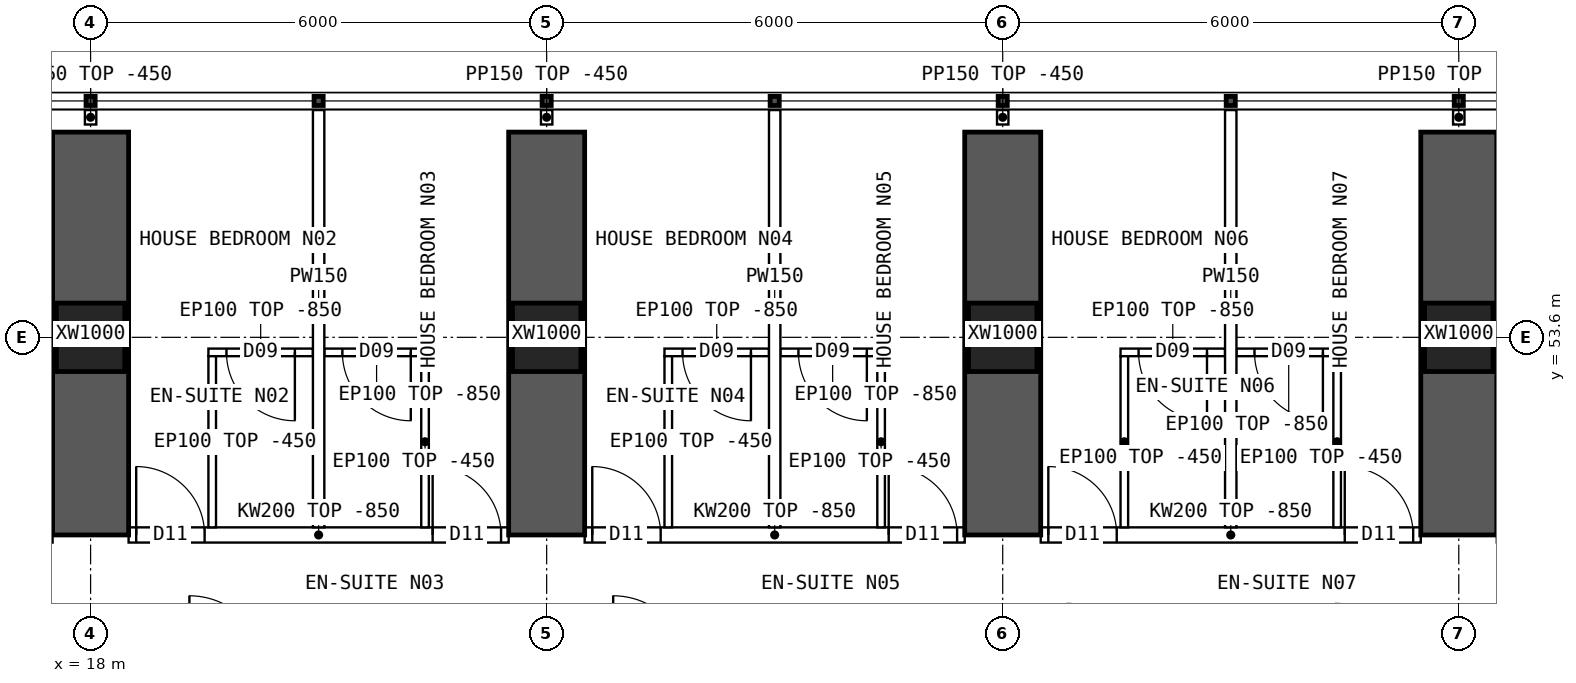
"""IFC4 building model, lengths in metres.
Left out: names, types, materials, properties, quantities, classifications, styles, units other than length and angle.
Written with IfcOpenShell. Run it as: python <this file> out.ifc"""

import sys

from ifc_helpers import new_model, si_unit, direction, frame, frame_2d, origin, origin_2d, place, context, subcontext, project, spatial, polyline, rectangle, hollow_rectangle, outline, extrude, element, fill, save


model = new_model("IFC4")
c1 = context("Model", 3, precision=1e-05, world=origin(), true_north=direction((0.0, 1.0)))
c2 = subcontext(c1, "Body", "Model", "MODEL_VIEW")
j1 = project(units=[si_unit("LENGTHUNIT", "METRE"), si_unit("PLANEANGLEUNIT", "RADIAN")], contexts=[c1])
p1 = place(None, origin())
s1 = spatial("IfcSite", under=j1, at=p1, CompositionType="ELEMENT")
p2 = place(p1, origin())
s2 = spatial("IfcBuilding", under=s1, at=p2, CompositionType="ELEMENT")
p3 = place(p2, frame((0.0, 0.0, 35.2)))
s3 = spatial("IfcBuildingStorey", under=s2, at=p3, CompositionType="ELEMENT", Elevation=35.2)
for number, where, z_axis, x_axis in (
    (1, (18.0, 53.6, 0.0), (0.0, 0.0, 1.0), (1.0, 0.0, 0.0)),
    (2, (24.0, 53.6, 0.0), (0.0, 0.0, 1.0), (1.0, 0.0, 0.0)),
    (3, (30.0, 53.6, 0.0), (0.0, 0.0, 1.0), (1.0, 0.0, 0.0)),
    (4, (36.0, 53.6, 0.0), (0.0, 0.0, 1.0), (1.0, 0.0, 0.0)),
):
    element("IfcColumn", number, at=place(p3, frame(where, z_axis=z_axis, x_axis=x_axis)), inside=s3, PredefinedType="COLUMN", context=c2, shape_type="SweptSolid", body=[
        extrude(hollow_rectangle(XDim=0.9, YDim=0.9, WallThickness=0.09, at=origin_2d()), origin(), (0.0, 0.0, 1.0), 3.75),
    ])
for number, where, z_axis, x_axis in (
    (5, (18.0, 51.0, 0.0), (0.0, 0.0, 1.0), (0.0, 1.0, 0.0)),
    (6, (24.0, 51.0, 0.0), (0.0, 0.0, 1.0), (0.0, 1.0, 0.0)),
    (7, (30.0, 51.0, 0.0), (0.0, 0.0, 1.0), (0.0, 1.0, 0.0)),
    (8, (36.0, 51.0, 0.0), (0.0, 0.0, 1.0), (0.0, 1.0, 0.0)),
):
    element("IfcWall", number, at=place(p3, frame(where, z_axis=z_axis, x_axis=x_axis)), inside=s3, PredefinedType="SHEAR", context=c2, shape_type="SweptSolid", body=[
        extrude(rectangle(XDim=5.3, YDim=1.0, at=frame_2d((2.65, 0.0))), origin(), (0.0, 0.0, 1.0), 3.75),
    ])
p4 = place(p3, frame((18.5, 51.0, 0.0), z_axis=(0.0, 0.0, 1.0), x_axis=(1.0, 0.0, 0.0)))
e9 = element("IfcWall", 9, at=p4, inside=s3, PredefinedType="SOLIDWALL", context=c2, shape_type="SweptSolid", body=[
    extrude(outline(polyline([(0.0, 0.0), (5.0, 0.0), (5.0, 2.9), (0.0, 2.9), (0.0, 0.0)])), frame((0.0, 0.1, 0.0), z_axis=(0.0, -1.0, 0.0), x_axis=(1.0, 0.0, 0.0)), (0.0, 0.0, 1.0), 0.2),
])
p5 = place(p4, frame((0.1, 0.0, 0.0)))
e10 = element("IfcOpeningElement", 10, at=p5, cuts=e9, PredefinedType="OPENING", context=c2, shape_type="SweptSolid", body=[
    extrude(rectangle(XDim=0.9, YDim=2.1, at=frame_2d((0.45, 1.05))), frame((0.0, 0.11, 0.0), z_axis=(0.0, -1.0, 0.0), x_axis=(1.0, 0.0, 0.0)), (0.0, 0.0, 1.0), 0.22),
])
p6 = place(p4, frame((4.0, 0.0, 0.0)))
e11 = element("IfcOpeningElement", 11, at=p6, cuts=e9, PredefinedType="OPENING", context=c2, shape_type="SweptSolid", body=[
    extrude(rectangle(XDim=0.9, YDim=2.1, at=frame_2d((0.45, 1.05))), frame((0.0, 0.11, 0.0), z_axis=(0.0, -1.0, 0.0), x_axis=(1.0, 0.0, 0.0)), (0.0, 0.0, 1.0), 0.22),
])
p7 = place(p3, frame((24.5, 51.0, 0.0), z_axis=(0.0, 0.0, 1.0), x_axis=(1.0, 0.0, 0.0)))
e12 = element("IfcWall", 12, at=p7, inside=s3, PredefinedType="SOLIDWALL", context=c2, shape_type="SweptSolid", body=[
    extrude(outline(polyline([(0.0, 0.0), (5.0, 0.0), (5.0, 2.9), (0.0, 2.9), (0.0, 0.0)])), frame((0.0, 0.1, 0.0), z_axis=(0.0, -1.0, 0.0), x_axis=(1.0, 0.0, 0.0)), (0.0, 0.0, 1.0), 0.2),
])
p8 = place(p7, frame((0.1, 0.0, 0.0)))
e13 = element("IfcOpeningElement", 13, at=p8, cuts=e12, PredefinedType="OPENING", context=c2, shape_type="SweptSolid", body=[
    extrude(rectangle(XDim=0.9, YDim=2.1, at=frame_2d((0.45, 1.05))), frame((0.0, 0.11, 0.0), z_axis=(0.0, -1.0, 0.0), x_axis=(1.0, 0.0, 0.0)), (0.0, 0.0, 1.0), 0.22),
])
p9 = place(p7, frame((4.0, 0.0, 0.0)))
e14 = element("IfcOpeningElement", 14, at=p9, cuts=e12, PredefinedType="OPENING", context=c2, shape_type="SweptSolid", body=[
    extrude(rectangle(XDim=0.9, YDim=2.1, at=frame_2d((0.45, 1.05))), frame((0.0, 0.11, 0.0), z_axis=(0.0, -1.0, 0.0), x_axis=(1.0, 0.0, 0.0)), (0.0, 0.0, 1.0), 0.22),
])
p10 = place(p3, frame((30.5, 51.0, 0.0), z_axis=(0.0, 0.0, 1.0), x_axis=(1.0, 0.0, 0.0)))
e15 = element("IfcWall", 15, at=p10, inside=s3, PredefinedType="SOLIDWALL", context=c2, shape_type="SweptSolid", body=[
    extrude(outline(polyline([(0.0, 0.0), (5.0, 0.0), (5.0, 2.9), (0.0, 2.9), (0.0, 0.0)])), frame((0.0, 0.1, 0.0), z_axis=(0.0, -1.0, 0.0), x_axis=(1.0, 0.0, 0.0)), (0.0, 0.0, 1.0), 0.2),
])
p11 = place(p10, frame((0.1, 0.0, 0.0)))
e16 = element("IfcOpeningElement", 16, at=p11, cuts=e15, PredefinedType="OPENING", context=c2, shape_type="SweptSolid", body=[
    extrude(rectangle(XDim=0.9, YDim=2.1, at=frame_2d((0.45, 1.05))), frame((0.0, 0.11, 0.0), z_axis=(0.0, -1.0, 0.0), x_axis=(1.0, 0.0, 0.0)), (0.0, 0.0, 1.0), 0.22),
])
p12 = place(p10, frame((4.0, 0.0, 0.0)))
e17 = element("IfcOpeningElement", 17, at=p12, cuts=e15, PredefinedType="OPENING", context=c2, shape_type="SweptSolid", body=[
    extrude(rectangle(XDim=0.9, YDim=2.1, at=frame_2d((0.45, 1.05))), frame((0.0, 0.11, 0.0), z_axis=(0.0, -1.0, 0.0), x_axis=(1.0, 0.0, 0.0)), (0.0, 0.0, 1.0), 0.22),
])
p13 = place(p3, frame((21.0, 56.59, 0.0), z_axis=(0.0, 0.0, 1.0), x_axis=(0.0, -1.0, 0.0)))
e18 = element("IfcWall", 18, at=p13, inside=s3, PredefinedType="PARTITIONING", context=c2, shape_type="SweptSolid", body=[
    extrude(outline(polyline([(0.0, 0.0), (5.49, 0.0), (5.49, 2.9), (5.442, 2.9), (5.44, 3.3), (3.192, 3.3), (3.19, 2.9), (2.792, 2.9), (2.79, 3.3), (0.0, 3.3), (0.0, 0.0)])), frame((0.0, 0.075, 0.0), z_axis=(0.0, -1.0, 0.0), x_axis=(1.0, 0.0, 0.0)), (0.0, 0.0, 1.0), 0.15),
])
p14 = place(p3, frame((19.55, 53.402, 0.0), z_axis=(0.0, 0.0, 1.0), x_axis=(1.0, 0.0, 0.0)))
e19 = element("IfcWall", 19, at=p14, inside=s3, PredefinedType="PARTITIONING", context=c2, shape_type="SweptSolid", body=[
    extrude(outline(polyline([(0.0, 0.0), (1.375, 0.0), (1.375, 2.9), (0.0, 2.9), (0.0, 0.0)])), frame((0.0, 0.05, 0.0), z_axis=(0.0, -1.0, 0.0), x_axis=(1.0, 0.0, 0.0)), (0.0, 0.0, 1.0), 0.1),
])
p15 = place(p14, frame((0.238, 0.0, 0.0)))
e20 = element("IfcOpeningElement", 20, at=p15, cuts=e19, PredefinedType="OPENING", context=c2, shape_type="SweptSolid", body=[
    extrude(rectangle(XDim=0.9, YDim=2.1, at=frame_2d((0.45, 1.05))), frame((0.0, 0.06, 0.0), z_axis=(0.0, -1.0, 0.0), x_axis=(1.0, 0.0, 0.0)), (0.0, 0.0, 1.0), 0.12),
])
p16 = place(p3, frame((19.6, 53.352, 0.0), z_axis=(0.0, 0.0, 1.0), x_axis=(0.0, -1.0, 0.0)))
e21 = element("IfcWall", 21, at=p16, inside=s3, PredefinedType="PARTITIONING", context=c2, shape_type="SweptSolid", body=[
    extrude(outline(polyline([(0.0, 0.0), (2.252, 0.0), (2.252, 2.9), (2.204, 2.9), (2.202, 3.3), (0.0, 3.3), (0.0, 0.0)])), frame((0.0, 0.05, 0.0), z_axis=(0.0, -1.0, 0.0), x_axis=(1.0, 0.0, 0.0)), (0.0, 0.0, 1.0), 0.1),
])
p17 = place(p3, frame((21.075, 53.402, 0.0), z_axis=(0.0, 0.0, 1.0), x_axis=(1.0, 0.0, 0.0)))
e22 = element("IfcWall", 22, at=p17, inside=s3, PredefinedType="PARTITIONING", context=c2, shape_type="SweptSolid", body=[
    extrude(outline(polyline([(0.0, 0.0), (1.375, 0.0), (1.375, 2.9), (0.0, 2.9), (0.0, 0.0)])), frame((0.0, 0.05, 0.0), z_axis=(0.0, -1.0, 0.0), x_axis=(1.0, 0.0, 0.0)), (0.0, 0.0, 1.0), 0.1),
])
p18 = place(p17, frame((0.238, 0.0, 0.0)))
e23 = element("IfcOpeningElement", 23, at=p18, cuts=e22, PredefinedType="OPENING", context=c2, shape_type="SweptSolid", body=[
    extrude(rectangle(XDim=0.9, YDim=2.1, at=frame_2d((0.45, 1.05))), frame((0.0, 0.06, 0.0), z_axis=(0.0, -1.0, 0.0), x_axis=(1.0, 0.0, 0.0)), (0.0, 0.0, 1.0), 0.12),
])
p19 = place(p3, frame((22.4, 53.352, 0.0), z_axis=(0.0, 0.0, 1.0), x_axis=(0.0, -1.0, 0.0)))
e24 = element("IfcWall", 24, at=p19, inside=s3, PredefinedType="PARTITIONING", context=c2, shape_type="SweptSolid", body=[
    extrude(outline(polyline([(0.0, 0.0), (2.252, 0.0), (2.252, 2.9), (2.204, 2.9), (2.202, 3.3), (0.0, 3.3), (0.0, 0.0)])), frame((0.0, 0.05, 0.0), z_axis=(0.0, -1.0, 0.0), x_axis=(1.0, 0.0, 0.0)), (0.0, 0.0, 1.0), 0.1),
])
p20 = place(p3, frame((27.0, 56.59, 0.0), z_axis=(0.0, 0.0, 1.0), x_axis=(0.0, -1.0, 0.0)))
e25 = element("IfcWall", 25, at=p20, inside=s3, PredefinedType="PARTITIONING", context=c2, shape_type="SweptSolid", body=[
    extrude(outline(polyline([(0.0, 0.0), (5.49, 0.0), (5.49, 2.9), (5.442, 2.9), (5.44, 3.3), (3.192, 3.3), (3.19, 2.9), (2.792, 2.9), (2.79, 3.3), (0.0, 3.3), (0.0, 0.0)])), frame((0.0, 0.075, 0.0), z_axis=(0.0, -1.0, 0.0), x_axis=(1.0, 0.0, 0.0)), (0.0, 0.0, 1.0), 0.15),
])
p21 = place(p3, frame((25.55, 53.402, 0.0), z_axis=(0.0, 0.0, 1.0), x_axis=(1.0, 0.0, 0.0)))
e26 = element("IfcWall", 26, at=p21, inside=s3, PredefinedType="PARTITIONING", context=c2, shape_type="SweptSolid", body=[
    extrude(outline(polyline([(0.0, 0.0), (1.375, 0.0), (1.375, 2.9), (0.0, 2.9), (0.0, 0.0)])), frame((0.0, 0.05, 0.0), z_axis=(0.0, -1.0, 0.0), x_axis=(1.0, 0.0, 0.0)), (0.0, 0.0, 1.0), 0.1),
])
p22 = place(p21, frame((0.238, 0.0, 0.0)))
e27 = element("IfcOpeningElement", 27, at=p22, cuts=e26, PredefinedType="OPENING", context=c2, shape_type="SweptSolid", body=[
    extrude(rectangle(XDim=0.9, YDim=2.1, at=frame_2d((0.45, 1.05))), frame((0.0, 0.06, 0.0), z_axis=(0.0, -1.0, 0.0), x_axis=(1.0, 0.0, 0.0)), (0.0, 0.0, 1.0), 0.12),
])
p23 = place(p3, frame((25.6, 53.352, 0.0), z_axis=(0.0, 0.0, 1.0), x_axis=(0.0, -1.0, 0.0)))
e28 = element("IfcWall", 28, at=p23, inside=s3, PredefinedType="PARTITIONING", context=c2, shape_type="SweptSolid", body=[
    extrude(outline(polyline([(0.0, 0.0), (2.252, 0.0), (2.252, 2.9), (2.204, 2.9), (2.202, 3.3), (0.0, 3.3), (0.0, 0.0)])), frame((0.0, 0.05, 0.0), z_axis=(0.0, -1.0, 0.0), x_axis=(1.0, 0.0, 0.0)), (0.0, 0.0, 1.0), 0.1),
])
p24 = place(p3, frame((27.075, 53.402, 0.0), z_axis=(0.0, 0.0, 1.0), x_axis=(1.0, 0.0, 0.0)))
e29 = element("IfcWall", 29, at=p24, inside=s3, PredefinedType="PARTITIONING", context=c2, shape_type="SweptSolid", body=[
    extrude(outline(polyline([(0.0, 0.0), (1.375, 0.0), (1.375, 2.9), (0.0, 2.9), (0.0, 0.0)])), frame((0.0, 0.05, 0.0), z_axis=(0.0, -1.0, 0.0), x_axis=(1.0, 0.0, 0.0)), (0.0, 0.0, 1.0), 0.1),
])
p25 = place(p24, frame((0.238, 0.0, 0.0)))
e30 = element("IfcOpeningElement", 30, at=p25, cuts=e29, PredefinedType="OPENING", context=c2, shape_type="SweptSolid", body=[
    extrude(rectangle(XDim=0.9, YDim=2.1, at=frame_2d((0.45, 1.05))), frame((0.0, 0.06, 0.0), z_axis=(0.0, -1.0, 0.0), x_axis=(1.0, 0.0, 0.0)), (0.0, 0.0, 1.0), 0.12),
])
p26 = place(p3, frame((28.4, 53.352, 0.0), z_axis=(0.0, 0.0, 1.0), x_axis=(0.0, -1.0, 0.0)))
e31 = element("IfcWall", 31, at=p26, inside=s3, PredefinedType="PARTITIONING", context=c2, shape_type="SweptSolid", body=[
    extrude(outline(polyline([(0.0, 0.0), (2.252, 0.0), (2.252, 2.9), (2.204, 2.9), (2.202, 3.3), (0.0, 3.3), (0.0, 0.0)])), frame((0.0, 0.05, 0.0), z_axis=(0.0, -1.0, 0.0), x_axis=(1.0, 0.0, 0.0)), (0.0, 0.0, 1.0), 0.1),
])
p27 = place(p3, frame((33.0, 56.59, 0.0), z_axis=(0.0, 0.0, 1.0), x_axis=(0.0, -1.0, 0.0)))
e32 = element("IfcWall", 32, at=p27, inside=s3, PredefinedType="PARTITIONING", context=c2, shape_type="SweptSolid", body=[
    extrude(outline(polyline([(0.0, 0.0), (5.49, 0.0), (5.49, 2.9), (5.442, 2.9), (5.44, 3.3), (3.192, 3.3), (3.19, 2.9), (2.792, 2.9), (2.79, 3.3), (0.0, 3.3), (0.0, 0.0)])), frame((0.0, 0.075, 0.0), z_axis=(0.0, -1.0, 0.0), x_axis=(1.0, 0.0, 0.0)), (0.0, 0.0, 1.0), 0.15),
])
p28 = place(p3, frame((31.55, 53.402, 0.0), z_axis=(0.0, 0.0, 1.0), x_axis=(1.0, 0.0, 0.0)))
e33 = element("IfcWall", 33, at=p28, inside=s3, PredefinedType="PARTITIONING", context=c2, shape_type="SweptSolid", body=[
    extrude(outline(polyline([(0.0, 0.0), (1.375, 0.0), (1.375, 2.9), (0.0, 2.9), (0.0, 0.0)])), frame((0.0, 0.05, 0.0), z_axis=(0.0, -1.0, 0.0), x_axis=(1.0, 0.0, 0.0)), (0.0, 0.0, 1.0), 0.1),
])
p29 = place(p28, frame((0.238, 0.0, 0.0)))
e34 = element("IfcOpeningElement", 34, at=p29, cuts=e33, PredefinedType="OPENING", context=c2, shape_type="SweptSolid", body=[
    extrude(rectangle(XDim=0.9, YDim=2.1, at=frame_2d((0.45, 1.05))), frame((0.0, 0.06, 0.0), z_axis=(0.0, -1.0, 0.0), x_axis=(1.0, 0.0, 0.0)), (0.0, 0.0, 1.0), 0.12),
])
p30 = place(p3, frame((31.6, 53.352, 0.0), z_axis=(0.0, 0.0, 1.0), x_axis=(0.0, -1.0, 0.0)))
e35 = element("IfcWall", 35, at=p30, inside=s3, PredefinedType="PARTITIONING", context=c2, shape_type="SweptSolid", body=[
    extrude(outline(polyline([(0.0, 0.0), (2.252, 0.0), (2.252, 2.9), (2.204, 2.9), (2.202, 3.3), (0.0, 3.3), (0.0, 0.0)])), frame((0.0, 0.05, 0.0), z_axis=(0.0, -1.0, 0.0), x_axis=(1.0, 0.0, 0.0)), (0.0, 0.0, 1.0), 0.1),
])
p31 = place(p3, frame((33.075, 53.402, 0.0), z_axis=(0.0, 0.0, 1.0), x_axis=(1.0, 0.0, 0.0)))
e36 = element("IfcWall", 36, at=p31, inside=s3, PredefinedType="PARTITIONING", context=c2, shape_type="SweptSolid", body=[
    extrude(outline(polyline([(0.0, 0.0), (1.375, 0.0), (1.375, 2.9), (0.0, 2.9), (0.0, 0.0)])), frame((0.0, 0.05, 0.0), z_axis=(0.0, -1.0, 0.0), x_axis=(1.0, 0.0, 0.0)), (0.0, 0.0, 1.0), 0.1),
])
p32 = place(p31, frame((0.238, 0.0, 0.0)))
e37 = element("IfcOpeningElement", 37, at=p32, cuts=e36, PredefinedType="OPENING", context=c2, shape_type="SweptSolid", body=[
    extrude(rectangle(XDim=0.9, YDim=2.1, at=frame_2d((0.45, 1.05))), frame((0.0, 0.06, 0.0), z_axis=(0.0, -1.0, 0.0), x_axis=(1.0, 0.0, 0.0)), (0.0, 0.0, 1.0), 0.12),
])
p33 = place(p3, frame((34.4, 53.352, 0.0), z_axis=(0.0, 0.0, 1.0), x_axis=(0.0, -1.0, 0.0)))
e38 = element("IfcWall", 38, at=p33, inside=s3, PredefinedType="PARTITIONING", context=c2, shape_type="SweptSolid", body=[
    extrude(outline(polyline([(0.0, 0.0), (2.252, 0.0), (2.252, 2.9), (2.204, 2.9), (2.202, 3.3), (0.0, 3.3), (0.0, 0.0)])), frame((0.0, 0.05, 0.0), z_axis=(0.0, -1.0, 0.0), x_axis=(1.0, 0.0, 0.0)), (0.0, 0.0, 1.0), 0.1),
])
for number, where, z_axis, x_axis in (
    (39, (18.0, 56.4, 0.0), (0.0, 0.0, 1.0), (0.0, 1.0, 0.0)),
    (40, (24.0, 56.4, 0.0), (0.0, 0.0, 1.0), (0.0, 1.0, 0.0)),
    (41, (30.0, 56.4, 0.0), (0.0, 0.0, 1.0), (0.0, 1.0, 0.0)),
    (42, (36.0, 56.4, 0.0), (0.0, 0.0, 1.0), (0.0, 1.0, 0.0)),
):
    element("IfcWall", number, at=place(p3, frame(where, z_axis=z_axis, x_axis=x_axis)), inside=s3, PredefinedType="PARTITIONING", context=c2, shape_type="SweptSolid", body=[
        extrude(rectangle(XDim=0.19, YDim=0.15, at=frame_2d((0.095, 0.0))), origin(), (0.0, 0.0, 1.0), 3.3),
    ])
p34 = place(p15, origin())
e43 = element("IfcDoor", 43, at=p34, inside=s3, OperationType="SINGLE_SWING_RIGHT", PredefinedType="DOOR", context=c2, shape_type="SweptSolid", body=[
    extrude(rectangle(XDim=0.9, YDim=2.1, at=frame_2d((0.45, 1.05))), frame((0.0, 0.025, 0.0), z_axis=(0.0, -1.0, 0.0), x_axis=(1.0, 0.0, 0.0)), (0.0, 0.0, 1.0), 0.05),
])
fill(e20, e43)
p35 = place(p5, origin())
e44 = element("IfcDoor", 44, at=p35, inside=s3, OperationType="SINGLE_SWING_LEFT", PredefinedType="DOOR", context=c2, shape_type="SweptSolid", body=[
    extrude(rectangle(XDim=0.9, YDim=2.1, at=frame_2d((0.45, 1.05))), frame((0.0, 0.025, 0.0), z_axis=(0.0, -1.0, 0.0), x_axis=(1.0, 0.0, 0.0)), (0.0, 0.0, 1.0), 0.05),
])
fill(e10, e44)
p36 = place(p18, origin())
e45 = element("IfcDoor", 45, at=p36, inside=s3, OperationType="SINGLE_SWING_RIGHT", PredefinedType="DOOR", context=c2, shape_type="SweptSolid", body=[
    extrude(rectangle(XDim=0.9, YDim=2.1, at=frame_2d((0.45, 1.05))), frame((0.0, 0.025, 0.0), z_axis=(0.0, -1.0, 0.0), x_axis=(1.0, 0.0, 0.0)), (0.0, 0.0, 1.0), 0.05),
])
fill(e23, e45)
p37 = place(p6, origin())
e46 = element("IfcDoor", 46, at=p37, inside=s3, OperationType="SINGLE_SWING_LEFT", PredefinedType="DOOR", context=c2, shape_type="SweptSolid", body=[
    extrude(rectangle(XDim=0.9, YDim=2.1, at=frame_2d((0.45, 1.05))), frame((0.0, 0.025, 0.0), z_axis=(0.0, -1.0, 0.0), x_axis=(1.0, 0.0, 0.0)), (0.0, 0.0, 1.0), 0.05),
])
fill(e11, e46)
p38 = place(p22, origin())
e47 = element("IfcDoor", 47, at=p38, inside=s3, OperationType="SINGLE_SWING_RIGHT", PredefinedType="DOOR", context=c2, shape_type="SweptSolid", body=[
    extrude(rectangle(XDim=0.9, YDim=2.1, at=frame_2d((0.45, 1.05))), frame((0.0, 0.025, 0.0), z_axis=(0.0, -1.0, 0.0), x_axis=(1.0, 0.0, 0.0)), (0.0, 0.0, 1.0), 0.05),
])
fill(e27, e47)
p39 = place(p8, origin())
e48 = element("IfcDoor", 48, at=p39, inside=s3, OperationType="SINGLE_SWING_LEFT", PredefinedType="DOOR", context=c2, shape_type="SweptSolid", body=[
    extrude(rectangle(XDim=0.9, YDim=2.1, at=frame_2d((0.45, 1.05))), frame((0.0, 0.025, 0.0), z_axis=(0.0, -1.0, 0.0), x_axis=(1.0, 0.0, 0.0)), (0.0, 0.0, 1.0), 0.05),
])
fill(e13, e48)
p40 = place(p25, origin())
e49 = element("IfcDoor", 49, at=p40, inside=s3, OperationType="SINGLE_SWING_RIGHT", PredefinedType="DOOR", context=c2, shape_type="SweptSolid", body=[
    extrude(rectangle(XDim=0.9, YDim=2.1, at=frame_2d((0.45, 1.05))), frame((0.0, 0.025, 0.0), z_axis=(0.0, -1.0, 0.0), x_axis=(1.0, 0.0, 0.0)), (0.0, 0.0, 1.0), 0.05),
])
fill(e30, e49)
p41 = place(p9, origin())
e50 = element("IfcDoor", 50, at=p41, inside=s3, OperationType="SINGLE_SWING_LEFT", PredefinedType="DOOR", context=c2, shape_type="SweptSolid", body=[
    extrude(rectangle(XDim=0.9, YDim=2.1, at=frame_2d((0.45, 1.05))), frame((0.0, 0.025, 0.0), z_axis=(0.0, -1.0, 0.0), x_axis=(1.0, 0.0, 0.0)), (0.0, 0.0, 1.0), 0.05),
])
fill(e14, e50)
p42 = place(p29, origin())
e51 = element("IfcDoor", 51, at=p42, inside=s3, OperationType="SINGLE_SWING_RIGHT", PredefinedType="DOOR", context=c2, shape_type="SweptSolid", body=[
    extrude(rectangle(XDim=0.9, YDim=2.1, at=frame_2d((0.45, 1.05))), frame((0.0, 0.025, 0.0), z_axis=(0.0, -1.0, 0.0), x_axis=(1.0, 0.0, 0.0)), (0.0, 0.0, 1.0), 0.05),
])
fill(e34, e51)
p43 = place(p11, origin())
e52 = element("IfcDoor", 52, at=p43, inside=s3, OperationType="SINGLE_SWING_LEFT", PredefinedType="DOOR", context=c2, shape_type="SweptSolid", body=[
    extrude(rectangle(XDim=0.9, YDim=2.1, at=frame_2d((0.45, 1.05))), frame((0.0, 0.025, 0.0), z_axis=(0.0, -1.0, 0.0), x_axis=(1.0, 0.0, 0.0)), (0.0, 0.0, 1.0), 0.05),
])
fill(e16, e52)
p44 = place(p32, origin())
e53 = element("IfcDoor", 53, at=p44, inside=s3, OperationType="SINGLE_SWING_RIGHT", PredefinedType="DOOR", context=c2, shape_type="SweptSolid", body=[
    extrude(rectangle(XDim=0.9, YDim=2.1, at=frame_2d((0.45, 1.05))), frame((0.0, 0.025, 0.0), z_axis=(0.0, -1.0, 0.0), x_axis=(1.0, 0.0, 0.0)), (0.0, 0.0, 1.0), 0.05),
])
fill(e37, e53)
p45 = place(p12, origin())
e54 = element("IfcDoor", 54, at=p45, inside=s3, OperationType="SINGLE_SWING_LEFT", PredefinedType="DOOR", context=c2, shape_type="SweptSolid", body=[
    extrude(rectangle(XDim=0.9, YDim=2.1, at=frame_2d((0.45, 1.05))), frame((0.0, 0.025, 0.0), z_axis=(0.0, -1.0, 0.0), x_axis=(1.0, 0.0, 0.0)), (0.0, 0.0, 1.0), 0.05),
])
fill(e17, e54)
save(model, sys.argv[1])
